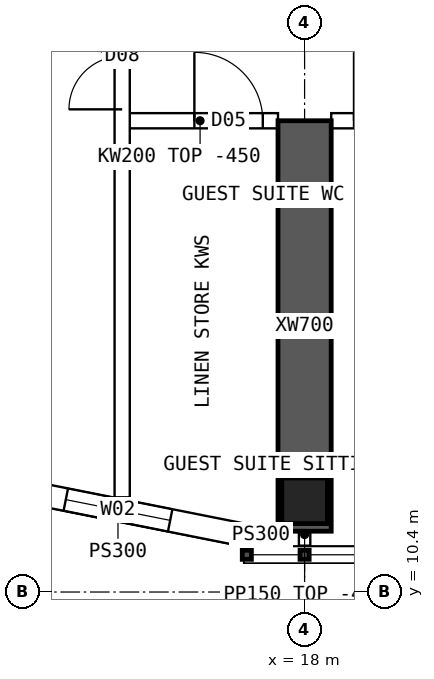
"""IFC4 building model, lengths in metres.
Left out: names, types, materials, properties, quantities, classifications, styles, units other than length and angle.
Written with IfcOpenShell. Run it as: python <this file> out.ifc"""

import sys

from ifc_helpers import new_model, si_unit, direction, frame, frame_2d, origin, origin_2d, place, context, subcontext, project, spatial, polyline, rectangle, hollow_rectangle, outline, extrude, element, fill, save


model = new_model("IFC4")
c1 = context("Model", 3, precision=1e-05, world=origin(), true_north=direction((0.0, 1.0)))
c2 = subcontext(c1, "Body", "Model", "MODEL_VIEW")
j1 = project(units=[si_unit("LENGTHUNIT", "METRE"), si_unit("PLANEANGLEUNIT", "RADIAN")], contexts=[c1])
p1 = place(None, origin())
s1 = spatial("IfcSite", under=j1, at=p1, CompositionType="ELEMENT")
p2 = place(p1, origin())
s2 = spatial("IfcBuilding", under=s1, at=p2, CompositionType="ELEMENT")
p3 = place(p2, frame((0.0, 0.0, 242.8)))
s3 = spatial("IfcBuildingStorey", under=s2, at=p3, CompositionType="ELEMENT", Elevation=242.8)
p4 = place(p3, frame((18.0, 11.6, 0.0), z_axis=(0.0, 0.0, 1.0), x_axis=(1.0, 0.0, 0.0)))
e1 = element("IfcColumn", 1, at=p4, inside=s3, PredefinedType="COLUMN", context=c2, shape_type="SweptSolid", body=[
    extrude(hollow_rectangle(XDim=0.6, YDim=0.6, WallThickness=0.06, at=origin_2d()), origin(), (0.0, 0.0, 1.0), 3.75),
])
p5 = place(p3, frame((18.0, 11.2, 0.0), z_axis=(0.0, 0.0, 1.0), x_axis=(0.0, 1.0, 0.0)))
e2 = element("IfcWall", 2, at=p5, inside=s3, PredefinedType="SHEAR", context=c2, shape_type="SweptSolid", body=[
    extrude(rectangle(XDim=5.4, YDim=0.7, at=frame_2d((2.7, 0.0))), origin(), (0.0, 0.0, 1.0), 3.75),
])
p6 = place(p3, frame((13.89, 11.808, 0.0), z_axis=(0.0, 0.0, 1.0), x_axis=(0.98078325777, -0.195100490205, 0.0)))
e3 = element("IfcWall", 3, at=p6, inside=s3, PredefinedType="SOLIDWALL", context=c2, shape_type="SweptSolid", body=[
    extrude(outline(polyline([(-0.03, -0.15), (3.405, -0.15), (3.345, 0.15), (0.03, 0.15), (-0.03, -0.15)])), origin(), (0.0, 0.0, 1.0), 3.3),
])
p7 = place(p6, frame((0.988, 0.0, 0.9)))
e4 = element("IfcOpeningElement", 4, at=p7, cuts=e3, PredefinedType="OPENING", context=c2, shape_type="SweptSolid", body=[
    extrude(rectangle(XDim=1.4, YDim=1.8, at=frame_2d((0.7, 0.9))), frame((0.0, 0.16, 0.0), z_axis=(0.0, -1.0, 0.0), x_axis=(1.0, 0.0, 0.0)), (0.0, 0.0, 1.0), 0.32),
])
p8 = place(p3, frame((17.2, 11.15, 0.0), z_axis=(0.0, 0.0, 1.0), x_axis=(1.0, 0.0, 0.0)))
e5 = element("IfcWall", 5, at=p8, inside=s3, PredefinedType="SOLIDWALL", context=c2, shape_type="SweptSolid", body=[
    extrude(rectangle(XDim=0.45, YDim=0.3, at=frame_2d((0.225, 0.0))), origin(), (0.0, 0.0, 1.0), 3.3),
])
p9 = place(p3, frame((15.6, 16.6, 0.0), z_axis=(0.0, 0.0, 1.0), x_axis=(1.0, 0.0, 0.0)))
e6 = element("IfcWall", 6, at=p9, inside=s3, PredefinedType="SOLIDWALL", context=c2, shape_type="SweptSolid", body=[
    extrude(rectangle(XDim=2.05, YDim=0.2, at=frame_2d((1.025, 0.0))), origin(), (0.0, 0.0, 1.0), 3.3),
])
p10 = place(p9, frame((0.95, 0.0, 0.0)))
e7 = element("IfcOpeningElement", 7, at=p10, cuts=e6, PredefinedType="OPENING", context=c2, shape_type="SweptSolid", body=[
    extrude(rectangle(XDim=0.9, YDim=2.1, at=frame_2d((0.45, 1.05))), frame((0.0, 0.11, 0.0), z_axis=(0.0, -1.0, 0.0), x_axis=(1.0, 0.0, 0.0)), (0.0, 0.0, 1.0), 0.22),
])
p11 = place(p3, frame((18.35, 16.6, 0.0), z_axis=(0.0, 0.0, 1.0), x_axis=(1.0, 0.0, 0.0)))
e8 = element("IfcWall", 8, at=p11, inside=s3, PredefinedType="SOLIDWALL", context=c2, shape_type="SweptSolid", body=[
    extrude(outline(polyline([(0.0, 0.0), (5.3, 0.0), (5.3, 2.9), (0.0, 2.9), (0.0, 0.0)])), frame((0.0, 0.1, 0.0), z_axis=(0.0, -1.0, 0.0), x_axis=(1.0, 0.0, 0.0)), (0.0, 0.0, 1.0), 0.2),
])
p12 = place(p11, frame((0.3, 0.0, 0.0)))
e9 = element("IfcOpeningElement", 9, at=p12, cuts=e8, PredefinedType="OPENING", context=c2, shape_type="SweptSolid", body=[
    extrude(rectangle(XDim=0.9, YDim=2.1, at=frame_2d((0.45, 1.05))), frame((0.0, 0.11, 0.0), z_axis=(0.0, -1.0, 0.0), x_axis=(1.0, 0.0, 0.0)), (0.0, 0.0, 1.0), 0.22),
])
p13 = place(p3, frame((15.6, 11.646, 0.0), z_axis=(0.0, 0.0, 1.0), x_axis=(0.0, 1.0, 0.0)))
e10 = element("IfcWall", 10, at=p13, inside=s3, PredefinedType="SOLIDWALL", context=c2, shape_type="SweptSolid", body=[
    extrude(rectangle(XDim=40.708, YDim=0.2, at=frame_2d((20.354, 0.0))), origin(), (0.0, 0.0, 1.0), 3.3),
])
p14 = place(p13, frame((21.194, 0.0, 0.0)))
e11 = element("IfcOpeningElement", 11, at=p14, cuts=e10, PredefinedType="OPENING", context=c2, shape_type="SweptSolid", body=[
    extrude(rectangle(XDim=1.2, YDim=2.1, at=frame_2d((0.6, 1.05))), frame((0.0, 0.11, 0.0), z_axis=(0.0, -1.0, 0.0), x_axis=(1.0, 0.0, 0.0)), (0.0, 0.0, 1.0), 0.22),
])
p15 = place(p13, frame((5.104, 0.0, 0.0)))
e12 = element("IfcOpeningElement", 12, at=p15, cuts=e10, PredefinedType="OPENING", context=c2, shape_type="SweptSolid", body=[
    extrude(rectangle(XDim=1.4, YDim=2.1, at=frame_2d((0.7, 1.05))), frame((0.0, 0.11, 0.0), z_axis=(0.0, -1.0, 0.0), x_axis=(1.0, 0.0, 0.0)), (0.0, 0.0, 1.0), 0.22),
])
p16 = place(p13, frame((34.104, 0.0, 0.0)))
e13 = element("IfcOpeningElement", 13, at=p16, cuts=e10, PredefinedType="OPENING", context=c2, shape_type="SweptSolid", body=[
    extrude(rectangle(XDim=1.4, YDim=2.1, at=frame_2d((0.7, 1.05))), frame((0.0, 0.11, 0.0), z_axis=(0.0, -1.0, 0.0), x_axis=(1.0, 0.0, 0.0)), (0.0, 0.0, 1.0), 0.22),
])
p17 = place(p3, frame((18.0, 11.3, 0.0), z_axis=(0.0, 0.0, 1.0), x_axis=(0.0, -1.0, 0.0)))
e14 = element("IfcWall", 14, at=p17, inside=s3, PredefinedType="PARTITIONING", context=c2, shape_type="SweptSolid", body=[
    extrude(rectangle(XDim=0.29, YDim=0.15, at=frame_2d((0.145, 0.0))), origin(), (0.0, 0.0, 1.0), 3.3),
])
p18 = place(p7, origin())
e15 = element("IfcWindow", 15, at=p18, inside=s3, PartitioningType="SINGLE_PANEL", PredefinedType="WINDOW", context=c2, shape_type="SweptSolid", body=[
    extrude(rectangle(XDim=1.4, YDim=1.8, at=frame_2d((0.7, 0.9))), frame((0.0, 0.03, 0.0), z_axis=(0.0, -1.0, 0.0), x_axis=(1.0, 0.0, 0.0)), (0.0, 0.0, 1.0), 0.06),
])
fill(e4, e15)
p19 = place(p15, origin())
e16 = element("IfcDoor", 16, at=p19, inside=s3, OperationType="DOUBLE_DOOR_SINGLE_SWING", PredefinedType="DOOR", context=c2, shape_type="SweptSolid", body=[
    extrude(rectangle(XDim=1.4, YDim=2.1, at=frame_2d((0.7, 1.05))), frame((0.0, 0.025, 0.0), z_axis=(0.0, -1.0, 0.0), x_axis=(1.0, 0.0, 0.0)), (0.0, 0.0, 1.0), 0.05),
])
fill(e12, e16)
p20 = place(p10, origin())
e17 = element("IfcDoor", 17, at=p20, inside=s3, OperationType="SINGLE_SWING_LEFT", PredefinedType="DOOR", context=c2, shape_type="SweptSolid", body=[
    extrude(rectangle(XDim=0.9, YDim=2.1, at=frame_2d((0.45, 1.05))), frame((0.0, 0.025, 0.0), z_axis=(0.0, -1.0, 0.0), x_axis=(1.0, 0.0, 0.0)), (0.0, 0.0, 1.0), 0.05),
])
fill(e7, e17)
save(model, sys.argv[1])
